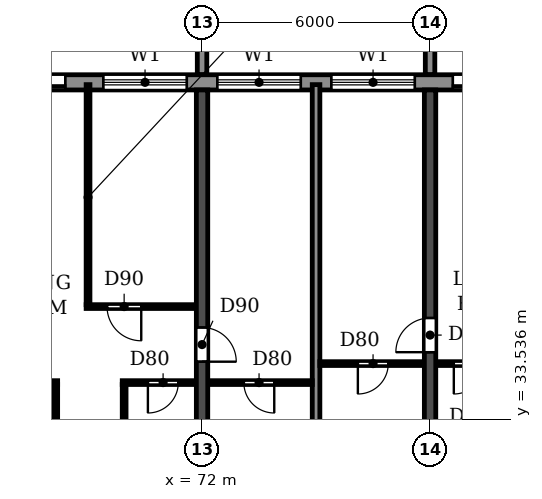
"""IFC4 building model, lengths in metres.
Left out: names, types, materials, properties, quantities, classifications, styles, units other than length and angle.
Written with IfcOpenShell. Run it as: python <this file> out.ifc"""

import sys

from ifc_helpers import new_model, si_unit, direction, frame, frame_2d, origin, place, context, subcontext, project, spatial, polyline, rectangle, outline, extrude, source, transform, mapped, element, fill, save


model = new_model("IFC4")
c1 = context("Model", 3, precision=1e-05, world=origin(), true_north=direction((0.0, 1.0)))
c2 = subcontext(c1, "Body", "Model", "MODEL_VIEW")
j1 = project(units=[si_unit("LENGTHUNIT", "METRE"), si_unit("PLANEANGLEUNIT", "RADIAN")], contexts=[c1])
p1 = place(None, origin())
s1 = spatial("IfcSite", under=j1, at=p1, CompositionType="ELEMENT")
p2 = place(p1, origin())
s2 = spatial("IfcBuilding", under=s1, at=p2, CompositionType="ELEMENT")
p3 = place(p2, frame((0.0, 0.0, 122.4)))
s3 = spatial("IfcBuildingStorey", under=s2, at=p3, CompositionType="ELEMENT", Elevation=122.4)
p4 = place(p3, frame((72.0, 30.525, 0.0), z_axis=(0.0, 0.0, 1.0), x_axis=(0.0, 1.0, 0.0)))
e1 = element("IfcWall", 1, at=p4, inside=s3, PredefinedType="SHEAR", context=c2, shape_type="SweptSolid", body=[
    extrude(rectangle(XDim=11.675, YDim=0.3, at=frame_2d((5.837, 0.0))), origin(), (0.0, 0.0, 1.0), 3.07),
])
p5 = place(p4, frame((4.525, 0.0, 0.0)))
e2 = element("IfcOpeningElement", 2, at=p5, cuts=e1, PredefinedType="OPENING", context=c2, shape_type="SweptSolid", body=[
    extrude(rectangle(XDim=0.9, YDim=2.1, at=frame_2d((0.45, 1.05))), frame((0.0, 0.16, 0.0), z_axis=(0.0, -1.0, 0.0), x_axis=(1.0, 0.0, 0.0)), (0.0, 0.0, 1.0), 0.32),
])
p6 = place(p3, frame((78.0, 30.525, 0.0), z_axis=(0.0, 0.0, 1.0), x_axis=(0.0, 1.0, 0.0)))
e3 = element("IfcWall", 3, at=p6, inside=s3, PredefinedType="SHEAR", context=c2, shape_type="SweptSolid", body=[
    extrude(rectangle(XDim=11.675, YDim=0.3, at=frame_2d((5.837, 0.0))), origin(), (0.0, 0.0, 1.0), 3.07),
])
p7 = place(p6, frame((4.775, 0.0, 0.0)))
e4 = element("IfcOpeningElement", 4, at=p7, cuts=e3, PredefinedType="OPENING", context=c2, shape_type="SweptSolid", body=[
    extrude(rectangle(XDim=0.9, YDim=2.1, at=frame_2d((0.45, 1.05))), frame((0.0, 0.16, 0.0), z_axis=(0.0, -1.0, 0.0), x_axis=(1.0, 0.0, 0.0)), (0.0, 0.0, 1.0), 0.32),
])
p8 = place(p3, frame((85.317, 42.4, 0.0), z_axis=(0.0, 0.0, 1.0), x_axis=(-1.0, 0.0, 0.0)))
e5 = element("IfcWall", 5, at=p8, inside=s3, PredefinedType="STANDARD", context=c2, shape_type="SweptSolid", body=[
    extrude(rectangle(XDim=68.634, YDim=0.4, at=frame_2d((34.317, 0.0))), origin(), (0.0, 0.0, 1.0), 3.07),
])
p9 = place(p8, frame((64.717, 0.0, 0.9)))
e6 = element("IfcOpeningElement", 6, at=p9, cuts=e5, PredefinedType="OPENING", context=c2, shape_type="SweptSolid", body=[
    extrude(rectangle(XDim=2.2, YDim=1.5, at=frame_2d((1.1, 0.75))), frame((0.0, 0.21, 0.0), z_axis=(0.0, -1.0, 0.0), x_axis=(1.0, 0.0, 0.0)), (0.0, 0.0, 1.0), 0.42),
])
p10 = place(p8, frame((61.917, 0.0, 0.0)))
e7 = element("IfcOpeningElement", 7, at=p10, cuts=e5, PredefinedType="OPENING", context=c2, shape_type="SweptSolid", body=[
    extrude(rectangle(XDim=1.8, YDim=2.4, at=frame_2d((0.9, 1.2))), frame((0.0, 0.21, 0.0), z_axis=(0.0, -1.0, 0.0), x_axis=(1.0, 0.0, 0.0)), (0.0, 0.0, 1.0), 0.42),
])
p11 = place(p8, frame((58.717, 0.0, 0.9)))
e8 = element("IfcOpeningElement", 8, at=p11, cuts=e5, PredefinedType="OPENING", context=c2, shape_type="SweptSolid", body=[
    extrude(rectangle(XDim=2.2, YDim=1.5, at=frame_2d((1.1, 0.75))), frame((0.0, 0.21, 0.0), z_axis=(0.0, -1.0, 0.0), x_axis=(1.0, 0.0, 0.0)), (0.0, 0.0, 1.0), 0.42),
])
p12 = place(p8, frame((55.917, 0.0, 0.0)))
e9 = element("IfcOpeningElement", 9, at=p12, cuts=e5, PredefinedType="OPENING", context=c2, shape_type="SweptSolid", body=[
    extrude(rectangle(XDim=1.8, YDim=2.4, at=frame_2d((0.9, 1.2))), frame((0.0, 0.21, 0.0), z_axis=(0.0, -1.0, 0.0), x_axis=(1.0, 0.0, 0.0)), (0.0, 0.0, 1.0), 0.42),
])
p13 = place(p8, frame((52.717, 0.0, 0.9)))
e10 = element("IfcOpeningElement", 10, at=p13, cuts=e5, PredefinedType="OPENING", context=c2, shape_type="SweptSolid", body=[
    extrude(rectangle(XDim=2.2, YDim=1.5, at=frame_2d((1.1, 0.75))), frame((0.0, 0.21, 0.0), z_axis=(0.0, -1.0, 0.0), x_axis=(1.0, 0.0, 0.0)), (0.0, 0.0, 1.0), 0.42),
])
p14 = place(p8, frame((49.917, 0.0, 0.0)))
e11 = element("IfcOpeningElement", 11, at=p14, cuts=e5, PredefinedType="OPENING", context=c2, shape_type="SweptSolid", body=[
    extrude(rectangle(XDim=1.8, YDim=2.4, at=frame_2d((0.9, 1.2))), frame((0.0, 0.21, 0.0), z_axis=(0.0, -1.0, 0.0), x_axis=(1.0, 0.0, 0.0)), (0.0, 0.0, 1.0), 0.42),
])
p15 = place(p8, frame((46.717, 0.0, 0.9)))
e12 = element("IfcOpeningElement", 12, at=p15, cuts=e5, PredefinedType="OPENING", context=c2, shape_type="SweptSolid", body=[
    extrude(rectangle(XDim=2.2, YDim=1.5, at=frame_2d((1.1, 0.75))), frame((0.0, 0.21, 0.0), z_axis=(0.0, -1.0, 0.0), x_axis=(1.0, 0.0, 0.0)), (0.0, 0.0, 1.0), 0.42),
])
p16 = place(p8, frame((43.917, 0.0, 0.0)))
e13 = element("IfcOpeningElement", 13, at=p16, cuts=e5, PredefinedType="OPENING", context=c2, shape_type="SweptSolid", body=[
    extrude(rectangle(XDim=1.8, YDim=2.4, at=frame_2d((0.9, 1.2))), frame((0.0, 0.21, 0.0), z_axis=(0.0, -1.0, 0.0), x_axis=(1.0, 0.0, 0.0)), (0.0, 0.0, 1.0), 0.42),
])
p17 = place(p8, frame((40.717, 0.0, 0.9)))
e14 = element("IfcOpeningElement", 14, at=p17, cuts=e5, PredefinedType="OPENING", context=c2, shape_type="SweptSolid", body=[
    extrude(rectangle(XDim=2.2, YDim=1.5, at=frame_2d((1.1, 0.75))), frame((0.0, 0.21, 0.0), z_axis=(0.0, -1.0, 0.0), x_axis=(1.0, 0.0, 0.0)), (0.0, 0.0, 1.0), 0.42),
])
p18 = place(p8, frame((37.717, 0.0, 0.9)))
e15 = element("IfcOpeningElement", 15, at=p18, cuts=e5, PredefinedType="OPENING", context=c2, shape_type="SweptSolid", body=[
    extrude(rectangle(XDim=2.2, YDim=1.5, at=frame_2d((1.1, 0.75))), frame((0.0, 0.21, 0.0), z_axis=(0.0, -1.0, 0.0), x_axis=(1.0, 0.0, 0.0)), (0.0, 0.0, 1.0), 0.42),
])
p19 = place(p8, frame((34.917, 0.0, 0.0)))
e16 = element("IfcOpeningElement", 16, at=p19, cuts=e5, PredefinedType="OPENING", context=c2, shape_type="SweptSolid", body=[
    extrude(rectangle(XDim=1.8, YDim=2.4, at=frame_2d((0.9, 1.2))), frame((0.0, 0.21, 0.0), z_axis=(0.0, -1.0, 0.0), x_axis=(1.0, 0.0, 0.0)), (0.0, 0.0, 1.0), 0.42),
])
p20 = place(p8, frame((31.717, 0.0, 0.9)))
e17 = element("IfcOpeningElement", 17, at=p20, cuts=e5, PredefinedType="OPENING", context=c2, shape_type="SweptSolid", body=[
    extrude(rectangle(XDim=2.2, YDim=1.5, at=frame_2d((1.1, 0.75))), frame((0.0, 0.21, 0.0), z_axis=(0.0, -1.0, 0.0), x_axis=(1.0, 0.0, 0.0)), (0.0, 0.0, 1.0), 0.42),
])
p21 = place(p8, frame((28.717, 0.0, 0.9)))
e18 = element("IfcOpeningElement", 18, at=p21, cuts=e5, PredefinedType="OPENING", context=c2, shape_type="SweptSolid", body=[
    extrude(rectangle(XDim=2.2, YDim=1.5, at=frame_2d((1.1, 0.75))), frame((0.0, 0.21, 0.0), z_axis=(0.0, -1.0, 0.0), x_axis=(1.0, 0.0, 0.0)), (0.0, 0.0, 1.0), 0.42),
])
p22 = place(p8, frame((25.717, 0.0, 0.9)))
e19 = element("IfcOpeningElement", 19, at=p22, cuts=e5, PredefinedType="OPENING", context=c2, shape_type="SweptSolid", body=[
    extrude(rectangle(XDim=2.2, YDim=1.5, at=frame_2d((1.1, 0.75))), frame((0.0, 0.21, 0.0), z_axis=(0.0, -1.0, 0.0), x_axis=(1.0, 0.0, 0.0)), (0.0, 0.0, 1.0), 0.42),
])
p23 = place(p8, frame((22.717, 0.0, 0.9)))
e20 = element("IfcOpeningElement", 20, at=p23, cuts=e5, PredefinedType="OPENING", context=c2, shape_type="SweptSolid", body=[
    extrude(rectangle(XDim=2.2, YDim=1.5, at=frame_2d((1.1, 0.75))), frame((0.0, 0.21, 0.0), z_axis=(0.0, -1.0, 0.0), x_axis=(1.0, 0.0, 0.0)), (0.0, 0.0, 1.0), 0.42),
])
p24 = place(p8, frame((19.917, 0.0, 0.0)))
e21 = element("IfcOpeningElement", 21, at=p24, cuts=e5, PredefinedType="OPENING", context=c2, shape_type="SweptSolid", body=[
    extrude(rectangle(XDim=1.8, YDim=2.4, at=frame_2d((0.9, 1.2))), frame((0.0, 0.21, 0.0), z_axis=(0.0, -1.0, 0.0), x_axis=(1.0, 0.0, 0.0)), (0.0, 0.0, 1.0), 0.42),
])
p25 = place(p8, frame((16.917, 0.0, 0.0)))
e22 = element("IfcOpeningElement", 22, at=p25, cuts=e5, PredefinedType="OPENING", context=c2, shape_type="SweptSolid", body=[
    extrude(rectangle(XDim=1.8, YDim=2.4, at=frame_2d((0.9, 1.2))), frame((0.0, 0.21, 0.0), z_axis=(0.0, -1.0, 0.0), x_axis=(1.0, 0.0, 0.0)), (0.0, 0.0, 1.0), 0.42),
])
p26 = place(p8, frame((13.717, 0.0, 0.9)))
e23 = element("IfcOpeningElement", 23, at=p26, cuts=e5, PredefinedType="OPENING", context=c2, shape_type="SweptSolid", body=[
    extrude(rectangle(XDim=2.2, YDim=1.5, at=frame_2d((1.1, 0.75))), frame((0.0, 0.21, 0.0), z_axis=(0.0, -1.0, 0.0), x_axis=(1.0, 0.0, 0.0)), (0.0, 0.0, 1.0), 0.42),
])
p27 = place(p8, frame((10.717, 0.0, 0.9)))
e24 = element("IfcOpeningElement", 24, at=p27, cuts=e5, PredefinedType="OPENING", context=c2, shape_type="SweptSolid", body=[
    extrude(rectangle(XDim=2.2, YDim=1.5, at=frame_2d((1.1, 0.75))), frame((0.0, 0.21, 0.0), z_axis=(0.0, -1.0, 0.0), x_axis=(1.0, 0.0, 0.0)), (0.0, 0.0, 1.0), 0.42),
])
p28 = place(p8, frame((7.717, 0.0, 0.9)))
e25 = element("IfcOpeningElement", 25, at=p28, cuts=e5, PredefinedType="OPENING", context=c2, shape_type="SweptSolid", body=[
    extrude(rectangle(XDim=2.2, YDim=1.5, at=frame_2d((1.1, 0.75))), frame((0.0, 0.21, 0.0), z_axis=(0.0, -1.0, 0.0), x_axis=(1.0, 0.0, 0.0)), (0.0, 0.0, 1.0), 0.42),
])
p29 = place(p8, frame((4.917, 0.0, 0.0)))
e26 = element("IfcOpeningElement", 26, at=p29, cuts=e5, PredefinedType="OPENING", context=c2, shape_type="SweptSolid", body=[
    extrude(rectangle(XDim=1.8, YDim=2.4, at=frame_2d((0.9, 1.2))), frame((0.0, 0.21, 0.0), z_axis=(0.0, -1.0, 0.0), x_axis=(1.0, 0.0, 0.0)), (0.0, 0.0, 1.0), 0.42),
])
p30 = place(p8, frame((1.717, 0.0, 0.9)))
e27 = element("IfcOpeningElement", 27, at=p30, cuts=e5, PredefinedType="OPENING", context=c2, shape_type="SweptSolid", body=[
    extrude(rectangle(XDim=2.2, YDim=1.5, at=frame_2d((1.1, 0.75))), frame((0.0, 0.21, 0.0), z_axis=(0.0, -1.0, 0.0), x_axis=(1.0, 0.0, 0.0)), (0.0, 0.0, 1.0), 0.42),
])
m1 = source(origin(), c2, "Body", "SweptSolid", [
    extrude(outline(polyline([(0.0, 0.0), (0.25, 0.0), (0.25, 3.1), (0.0, 3.1), (0.0, 0.0)])), origin(), (0.0, 0.0, 1.0), 3.1),
])
for number, where in (
    (28, (71.875, 42.6, 0.0)),
    (29, (77.875, 42.6, 0.0)),
):
    element("IfcWall", number, at=place(p3, frame(where)), inside=s3, PredefinedType="STANDARD", context=c2, shape_type="MappedRepresentation", body=[
        mapped(m1, transform((0.0, 0.0, 0.0))),
    ])
p31 = place(p3, frame((75.0, 30.535, 0.0), z_axis=(0.0, 0.0, 1.0), x_axis=(0.0, 1.0, 0.0)))
e30 = element("IfcWall", 30, at=p31, inside=s3, PredefinedType="PARTITIONING", context=c2, shape_type="SweptSolid", body=[
    extrude(rectangle(XDim=11.805, YDim=0.2, at=frame_2d((5.903, 0.0))), origin(), (0.0, 0.0, 1.0), 3.07),
])
p32 = place(p3, frame((66.16, 34.5, 0.0), z_axis=(0.0, 0.0, 1.0), x_axis=(1.0, 0.0, 0.0)))
e31 = element("IfcWall", 31, at=p32, inside=s3, PredefinedType="PARTITIONING", context=c2, shape_type="SweptSolid", body=[
    extrude(rectangle(XDim=2.04, YDim=0.1, at=frame_2d((1.02, 0.0))), origin(), (0.0, 0.0, 1.0), 3.07),
])
p33 = place(p32, frame((0.465, 0.0, 0.0)))
e32 = element("IfcOpeningElement", 32, at=p33, cuts=e31, PredefinedType="OPENING", context=c2, shape_type="SweptSolid", body=[
    extrude(rectangle(XDim=0.9, YDim=2.1, at=frame_2d((0.45, 1.05))), frame((0.0, 0.06, 0.0), z_axis=(0.0, -1.0, 0.0), x_axis=(1.0, 0.0, 0.0)), (0.0, 0.0, 1.0), 0.12),
])
p34 = place(p3, frame((69.9, 34.5, 0.0), z_axis=(0.0, 0.0, 1.0), x_axis=(1.0, 0.0, 0.0)))
e33 = element("IfcWall", 33, at=p34, inside=s3, PredefinedType="PARTITIONING", context=c2, shape_type="SweptSolid", body=[
    extrude(rectangle(XDim=1.94, YDim=0.1, at=frame_2d((0.97, 0.0))), origin(), (0.0, 0.0, 1.0), 3.07),
])
p35 = place(p34, frame((0.675, 0.0, 0.0)))
e34 = element("IfcOpeningElement", 34, at=p35, cuts=e33, PredefinedType="OPENING", context=c2, shape_type="SweptSolid", body=[
    extrude(rectangle(XDim=0.8, YDim=2.1, at=frame_2d((0.4, 1.05))), frame((0.0, 0.06, 0.0), z_axis=(0.0, -1.0, 0.0), x_axis=(1.0, 0.0, 0.0)), (0.0, 0.0, 1.0), 0.12),
])
p36 = place(p3, frame((72.16, 34.5, 0.0), z_axis=(0.0, 0.0, 1.0), x_axis=(1.0, 0.0, 0.0)))
e35 = element("IfcWall", 35, at=p36, inside=s3, PredefinedType="PARTITIONING", context=c2, shape_type="SweptSolid", body=[
    extrude(rectangle(XDim=2.74, YDim=0.1, at=frame_2d((1.37, 0.0))), origin(), (0.0, 0.0, 1.0), 3.07),
])
p37 = place(p36, frame((0.94, 0.0, 0.0)))
e36 = element("IfcOpeningElement", 36, at=p37, cuts=e35, PredefinedType="OPENING", context=c2, shape_type="SweptSolid", body=[
    extrude(rectangle(XDim=0.8, YDim=2.1, at=frame_2d((0.4, 1.05))), frame((0.0, 0.06, 0.0), z_axis=(0.0, -1.0, 0.0), x_axis=(1.0, 0.0, 0.0)), (0.0, 0.0, 1.0), 0.12),
])
p38 = place(p3, frame((75.1, 35.0, 0.0), z_axis=(0.0, 0.0, 1.0), x_axis=(1.0, 0.0, 0.0)))
e37 = element("IfcWall", 37, at=p38, inside=s3, PredefinedType="PARTITIONING", context=c2, shape_type="SweptSolid", body=[
    extrude(rectangle(XDim=2.74, YDim=0.1, at=frame_2d((1.37, 0.0))), origin(), (0.0, 0.0, 1.0), 3.07),
])
p39 = place(p38, frame((1.0, 0.0, 0.0)))
e38 = element("IfcOpeningElement", 38, at=p39, cuts=e37, PredefinedType="OPENING", context=c2, shape_type="SweptSolid", body=[
    extrude(rectangle(XDim=0.8, YDim=2.1, at=frame_2d((0.4, 1.05))), frame((0.0, 0.06, 0.0), z_axis=(0.0, -1.0, 0.0), x_axis=(1.0, 0.0, 0.0)), (0.0, 0.0, 1.0), 0.12),
])
p40 = place(p3, frame((78.16, 35.0, 0.0), z_axis=(0.0, 0.0, 1.0), x_axis=(1.0, 0.0, 0.0)))
e39 = element("IfcWall", 39, at=p40, inside=s3, PredefinedType="PARTITIONING", context=c2, shape_type="SweptSolid", body=[
    extrude(rectangle(XDim=1.94, YDim=0.1, at=frame_2d((0.97, 0.0))), origin(), (0.0, 0.0, 1.0), 3.07),
])
p41 = place(p40, frame((0.465, 0.0, 0.0)))
e40 = element("IfcOpeningElement", 40, at=p41, cuts=e39, PredefinedType="OPENING", context=c2, shape_type="SweptSolid", body=[
    extrude(rectangle(XDim=0.8, YDim=2.1, at=frame_2d((0.4, 1.05))), frame((0.0, 0.06, 0.0), z_axis=(0.0, -1.0, 0.0), x_axis=(1.0, 0.0, 0.0)), (0.0, 0.0, 1.0), 0.12),
])
p42 = place(p3, frame((68.95, 36.5, 0.0), z_axis=(0.0, 0.0, 1.0), x_axis=(1.0, 0.0, 0.0)))
e41 = element("IfcWall", 41, at=p42, inside=s3, PredefinedType="PARTITIONING", context=c2, shape_type="SweptSolid", body=[
    extrude(rectangle(XDim=2.89, YDim=0.1, at=frame_2d((1.445, 0.0))), origin(), (0.0, 0.0, 1.0), 3.07),
])
p43 = place(p42, frame((0.55, 0.0, 0.0)))
e42 = element("IfcOpeningElement", 42, at=p43, cuts=e41, PredefinedType="OPENING", context=c2, shape_type="SweptSolid", body=[
    extrude(rectangle(XDim=0.9, YDim=2.1, at=frame_2d((0.45, 1.05))), frame((0.0, 0.06, 0.0), z_axis=(0.0, -1.0, 0.0), x_axis=(1.0, 0.0, 0.0)), (0.0, 0.0, 1.0), 0.12),
])
p44 = place(p3, frame((68.15, 30.535, 0.0), z_axis=(0.0, 0.0, 1.0), x_axis=(0.0, 1.0, 0.0)))
e43 = element("IfcWall", 43, at=p44, inside=s3, PredefinedType="PARTITIONING", context=c2, shape_type="SweptSolid", body=[
    extrude(rectangle(XDim=3.915, YDim=0.1, at=frame_2d((1.958, 0.0))), origin(), (0.0, 0.0, 1.0), 3.07),
])
p45 = place(p3, frame((69.0, 36.55, 0.0), z_axis=(0.0, 0.0, 1.0), x_axis=(0.0, 1.0, 0.0)))
e44 = element("IfcWall", 44, at=p45, inside=s3, PredefinedType="PARTITIONING", context=c2, shape_type="SweptSolid", body=[
    extrude(rectangle(XDim=5.79, YDim=0.1, at=frame_2d((2.895, 0.0))), origin(), (0.0, 0.0, 1.0), 3.07),
])
p46 = place(p3, frame((69.95, 30.535, 0.0), z_axis=(0.0, 0.0, 1.0), x_axis=(0.0, 1.0, 0.0)))
e45 = element("IfcWall", 45, at=p46, inside=s3, PredefinedType="PARTITIONING", context=c2, shape_type="SweptSolid", body=[
    extrude(rectangle(XDim=3.915, YDim=0.1, at=frame_2d((1.958, 0.0))), origin(), (0.0, 0.0, 1.0), 3.07),
])
p47 = place(p25, origin())
e46 = element("IfcDoor", 46, at=p47, inside=s3, OperationType="DOUBLE_DOOR_SLIDING", PredefinedType="DOOR", context=c2, shape_type="SweptSolid", body=[
    extrude(rectangle(XDim=1.8, YDim=2.4, at=frame_2d((0.9, 1.2))), frame((0.0, 0.025, 0.0), z_axis=(0.0, -1.0, 0.0), x_axis=(1.0, 0.0, 0.0)), (0.0, 0.0, 1.0), 0.05),
])
fill(e22, e46)
p48 = place(p26, origin())
e47 = element("IfcWindow", 47, at=p48, inside=s3, PartitioningType="DOUBLE_PANEL_HORIZONTAL", PredefinedType="WINDOW", context=c2, shape_type="SweptSolid", body=[
    extrude(rectangle(XDim=2.2, YDim=1.5, at=frame_2d((1.1, 0.75))), frame((0.0, 0.03, 0.0), z_axis=(0.0, -1.0, 0.0), x_axis=(1.0, 0.0, 0.0)), (0.0, 0.0, 1.0), 0.06),
])
fill(e23, e47)
p49 = place(p27, origin())
e48 = element("IfcWindow", 48, at=p49, inside=s3, PartitioningType="DOUBLE_PANEL_HORIZONTAL", PredefinedType="WINDOW", context=c2, shape_type="SweptSolid", body=[
    extrude(rectangle(XDim=2.2, YDim=1.5, at=frame_2d((1.1, 0.75))), frame((0.0, 0.03, 0.0), z_axis=(0.0, -1.0, 0.0), x_axis=(1.0, 0.0, 0.0)), (0.0, 0.0, 1.0), 0.06),
])
fill(e24, e48)
p50 = place(p28, origin())
e49 = element("IfcWindow", 49, at=p50, inside=s3, PartitioningType="DOUBLE_PANEL_HORIZONTAL", PredefinedType="WINDOW", context=c2, shape_type="SweptSolid", body=[
    extrude(rectangle(XDim=2.2, YDim=1.5, at=frame_2d((1.1, 0.75))), frame((0.0, 0.03, 0.0), z_axis=(0.0, -1.0, 0.0), x_axis=(1.0, 0.0, 0.0)), (0.0, 0.0, 1.0), 0.06),
])
fill(e25, e49)
p51 = place(p29, origin())
e50 = element("IfcDoor", 50, at=p51, inside=s3, OperationType="DOUBLE_DOOR_SLIDING", PredefinedType="DOOR", context=c2, shape_type="SweptSolid", body=[
    extrude(rectangle(XDim=1.8, YDim=2.4, at=frame_2d((0.9, 1.2))), frame((0.0, 0.025, 0.0), z_axis=(0.0, -1.0, 0.0), x_axis=(1.0, 0.0, 0.0)), (0.0, 0.0, 1.0), 0.05),
])
fill(e26, e50)
p52 = place(p37, frame((0.8, 0.0, 0.0), z_axis=(0.0, 0.0, 1.0), x_axis=(-1.0, 0.0, 0.0)))
e51 = element("IfcDoor", 51, at=p52, inside=s3, OperationType="SINGLE_SWING_LEFT", PredefinedType="DOOR", context=c2, shape_type="SweptSolid", body=[
    extrude(rectangle(XDim=0.8, YDim=2.1, at=frame_2d((0.4, 1.05))), frame((0.0, 0.025, 0.0), z_axis=(0.0, -1.0, 0.0), x_axis=(1.0, 0.0, 0.0)), (0.0, 0.0, 1.0), 0.05),
])
fill(e36, e51)
p53 = place(p43, frame((0.9, 0.0, 0.0), z_axis=(0.0, 0.0, 1.0), x_axis=(-1.0, 0.0, 0.0)))
e52 = element("IfcDoor", 52, at=p53, inside=s3, OperationType="SINGLE_SWING_LEFT", PredefinedType="DOOR", context=c2, shape_type="SweptSolid", body=[
    extrude(rectangle(XDim=0.9, YDim=2.1, at=frame_2d((0.45, 1.05))), frame((0.0, 0.025, 0.0), z_axis=(0.0, -1.0, 0.0), x_axis=(1.0, 0.0, 0.0)), (0.0, 0.0, 1.0), 0.05),
])
fill(e42, e52)
p54 = place(p35, frame((0.8, 0.0, 0.0), z_axis=(0.0, 0.0, 1.0), x_axis=(-1.0, 0.0, 0.0)))
e53 = element("IfcDoor", 53, at=p54, inside=s3, OperationType="SINGLE_SWING_RIGHT", PredefinedType="DOOR", context=c2, shape_type="SweptSolid", body=[
    extrude(rectangle(XDim=0.8, YDim=2.1, at=frame_2d((0.4, 1.05))), frame((0.0, 0.025, 0.0), z_axis=(0.0, -1.0, 0.0), x_axis=(1.0, 0.0, 0.0)), (0.0, 0.0, 1.0), 0.05),
])
fill(e34, e53)
p55 = place(p5, frame((0.9, 0.0, 0.0), z_axis=(0.0, 0.0, 1.0), x_axis=(-1.0, 0.0, 0.0)))
e54 = element("IfcDoor", 54, at=p55, inside=s3, OperationType="SINGLE_SWING_RIGHT", PredefinedType="DOOR", context=c2, shape_type="SweptSolid", body=[
    extrude(rectangle(XDim=0.9, YDim=2.1, at=frame_2d((0.45, 1.05))), frame((0.0, 0.025, 0.0), z_axis=(0.0, -1.0, 0.0), x_axis=(1.0, 0.0, 0.0)), (0.0, 0.0, 1.0), 0.05),
])
fill(e2, e54)
p56 = place(p39, frame((0.8, 0.0, 0.0), z_axis=(0.0, 0.0, 1.0), x_axis=(-1.0, 0.0, 0.0)))
e55 = element("IfcDoor", 55, at=p56, inside=s3, OperationType="SINGLE_SWING_RIGHT", PredefinedType="DOOR", context=c2, shape_type="SweptSolid", body=[
    extrude(rectangle(XDim=0.8, YDim=2.1, at=frame_2d((0.4, 1.05))), frame((0.0, 0.025, 0.0), z_axis=(0.0, -1.0, 0.0), x_axis=(1.0, 0.0, 0.0)), (0.0, 0.0, 1.0), 0.05),
])
fill(e38, e55)
p57 = place(p7, origin())
e56 = element("IfcDoor", 56, at=p57, inside=s3, OperationType="SINGLE_SWING_LEFT", PredefinedType="DOOR", context=c2, shape_type="SweptSolid", body=[
    extrude(rectangle(XDim=0.9, YDim=2.1, at=frame_2d((0.45, 1.05))), frame((0.0, 0.025, 0.0), z_axis=(0.0, -1.0, 0.0), x_axis=(1.0, 0.0, 0.0)), (0.0, 0.0, 1.0), 0.05),
])
fill(e4, e56)
p58 = place(p41, frame((0.8, 0.0, 0.0), z_axis=(0.0, 0.0, 1.0), x_axis=(-1.0, 0.0, 0.0)))
e57 = element("IfcDoor", 57, at=p58, inside=s3, OperationType="SINGLE_SWING_RIGHT", PredefinedType="DOOR", context=c2, shape_type="SweptSolid", body=[
    extrude(rectangle(XDim=0.8, YDim=2.1, at=frame_2d((0.4, 1.05))), frame((0.0, 0.025, 0.0), z_axis=(0.0, -1.0, 0.0), x_axis=(1.0, 0.0, 0.0)), (0.0, 0.0, 1.0), 0.05),
])
fill(e40, e57)
save(model, sys.argv[1])
